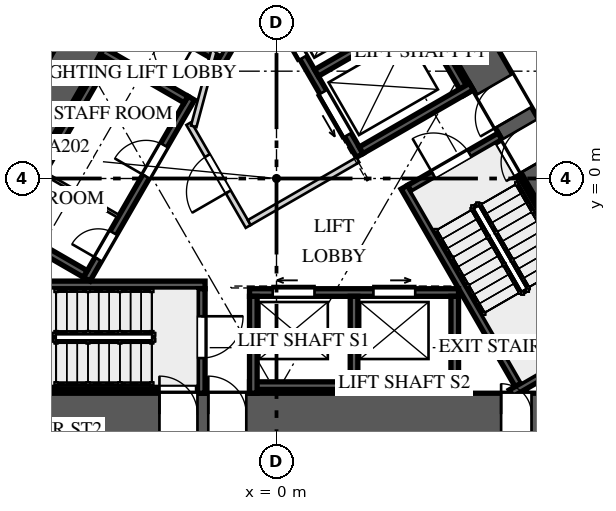
"""IFC4 building model, lengths in metres.
Left out: names, types, materials, properties, quantities, classifications, styles, units other than length and angle.
Written with IfcOpenShell. Run it as: python <this file> out.ifc"""

import sys

from ifc_helpers import new_model, si_unit, direction, frame, frame_2d, origin, place, context, subcontext, project, spatial, rectangle, extrude, element, fill, save


model = new_model("IFC4")
c1 = context("Model", 3, precision=1e-05, world=origin(), true_north=direction((0.0, 1.0)))
c2 = subcontext(c1, "Body", "Model", "MODEL_VIEW")
j1 = project(units=[si_unit("LENGTHUNIT", "METRE"), si_unit("PLANEANGLEUNIT", "RADIAN")], contexts=[c1])
p1 = place(None, origin())
s1 = spatial("IfcSite", under=j1, at=p1, CompositionType="ELEMENT")
p2 = place(p1, origin())
s2 = spatial("IfcBuilding", under=s1, at=p2, CompositionType="ELEMENT")
p3 = place(p2, origin())
s3 = spatial("IfcBuildingStorey", under=s2, at=p3, CompositionType="ELEMENT", Elevation=0.0)
p4 = place(p3, frame((-1.126, 10.45, 0.0), z_axis=(0.0, 0.0, 1.0), x_axis=(-0.500001757713, -0.866024388966, 0.0)))
e1 = element("IfcWall", 1, at=p4, inside=s3, PredefinedType="SHEAR", context=c2, shape_type="SweptSolid", body=[
    extrude(rectangle(XDim=16.974, YDim=1.1, at=frame_2d((8.487, 0.0))), origin(), (0.0, 0.0, 1.0), 10.0),
])
p5 = place(p4, frame((5.407, 0.0, 0.0)))
e2 = element("IfcOpeningElement", 2, at=p5, cuts=e1, PredefinedType="OPENING", context=c2, shape_type="SweptSolid", body=[
    extrude(rectangle(XDim=1.0, YDim=2.4, at=frame_2d((0.5, 1.2))), frame((0.0, 0.56, 0.0), z_axis=(0.0, -1.0, 0.0), x_axis=(1.0, 0.0, 0.0)), (0.0, 0.0, 1.0), 1.12),
])
p6 = place(p4, frame((6.692, 0.0, 0.0)))
e3 = element("IfcOpeningElement", 3, at=p6, cuts=e1, PredefinedType="OPENING", context=c2, shape_type="SweptSolid", body=[
    extrude(rectangle(XDim=1.0, YDim=2.4, at=frame_2d((0.5, 1.2))), frame((0.0, 0.56, 0.0), z_axis=(0.0, -1.0, 0.0), x_axis=(1.0, 0.0, 0.0)), (0.0, 0.0, 1.0), 1.12),
])
p7 = place(p3, frame((-8.487, -6.2, 0.0), z_axis=(0.0, 0.0, 1.0), x_axis=(1.0, 0.0, 0.0)))
e4 = element("IfcWall", 4, at=p7, inside=s3, PredefinedType="SHEAR", context=c2, shape_type="SweptSolid", body=[
    extrude(rectangle(XDim=16.974, YDim=1.1, at=frame_2d((8.487, 0.0))), origin(), (0.0, 0.0, 1.0), 10.0),
])
p8 = place(p7, frame((5.407, 0.0, 0.0)))
e5 = element("IfcOpeningElement", 5, at=p8, cuts=e4, PredefinedType="OPENING", context=c2, shape_type="SweptSolid", body=[
    extrude(rectangle(XDim=1.0, YDim=2.4, at=frame_2d((0.5, 1.2))), frame((0.0, 0.56, 0.0), z_axis=(0.0, -1.0, 0.0), x_axis=(1.0, 0.0, 0.0)), (0.0, 0.0, 1.0), 1.12),
])
p9 = place(p7, frame((6.692, 0.0, 0.0)))
e6 = element("IfcOpeningElement", 6, at=p9, cuts=e4, PredefinedType="OPENING", context=c2, shape_type="SweptSolid", body=[
    extrude(rectangle(XDim=1.0, YDim=2.4, at=frame_2d((0.5, 1.2))), frame((0.0, 0.56, 0.0), z_axis=(0.0, -1.0, 0.0), x_axis=(1.0, 0.0, 0.0)), (0.0, 0.0, 1.0), 1.12),
])
p10 = place(p7, frame((14.397, 0.0, 0.0)))
e7 = element("IfcOpeningElement", 7, at=p10, cuts=e4, PredefinedType="OPENING", context=c2, shape_type="SweptSolid", body=[
    extrude(rectangle(XDim=0.8, YDim=2.1, at=frame_2d((0.4, 1.05))), frame((0.0, 0.56, 0.0), z_axis=(0.0, -1.0, 0.0), x_axis=(1.0, 0.0, 0.0)), (0.0, 0.0, 1.0), 1.12),
])
p11 = place(p3, frame((9.613, -4.25, 0.0), z_axis=(0.0, 0.0, 1.0), x_axis=(-0.500001757713, 0.866024388966, 0.0)))
e8 = element("IfcWall", 8, at=p11, inside=s3, PredefinedType="SHEAR", context=c2, shape_type="SweptSolid", body=[
    extrude(rectangle(XDim=16.974, YDim=1.1, at=frame_2d((8.487, 0.0))), origin(), (0.0, 0.0, 1.0), 10.0),
])
p12 = place(p11, frame((5.407, 0.0, 0.0)))
e9 = element("IfcOpeningElement", 9, at=p12, cuts=e8, PredefinedType="OPENING", context=c2, shape_type="SweptSolid", body=[
    extrude(rectangle(XDim=1.0, YDim=2.4, at=frame_2d((0.5, 1.2))), frame((0.0, 0.56, 0.0), z_axis=(0.0, -1.0, 0.0), x_axis=(1.0, 0.0, 0.0)), (0.0, 0.0, 1.0), 1.12),
])
p13 = place(p11, frame((6.762, 0.0, 0.0)))
e10 = element("IfcOpeningElement", 10, at=p13, cuts=e8, PredefinedType="OPENING", context=c2, shape_type="SweptSolid", body=[
    extrude(rectangle(XDim=1.0, YDim=2.4, at=frame_2d((0.5, 1.2))), frame((0.0, 0.56, 0.0), z_axis=(0.0, -1.0, 0.0), x_axis=(1.0, 0.0, 0.0)), (0.0, 0.0, 1.0), 1.12),
])
p14 = place(p11, frame((13.889, 0.0, 0.0)))
e11 = element("IfcOpeningElement", 11, at=p14, cuts=e8, PredefinedType="OPENING", context=c2, shape_type="SweptSolid", body=[
    extrude(rectangle(XDim=0.8, YDim=2.1, at=frame_2d((0.4, 1.05))), frame((0.0, 0.56, 0.0), z_axis=(0.0, -1.0, 0.0), x_axis=(1.0, 0.0, 0.0)), (0.0, 0.0, 1.0), 1.12),
])
p15 = place(p3, frame((1.646, 8.45, 0.0), z_axis=(0.0, 0.0, 1.0), x_axis=(-0.500006002103, -0.866021938441, 0.0)))
e12 = element("IfcWall", 12, at=p15, inside=s3, PredefinedType="SOLIDWALL", context=c2, shape_type="SweptSolid", body=[
    extrude(rectangle(XDim=6.261, YDim=0.2, at=frame_2d((3.13, 0.0))), origin(), (0.0, 0.0, 1.0), 9.65),
])
p16 = place(p3, frame((-1.521, 3.165, 0.0), z_axis=(0.0, 0.0, 1.0), x_axis=(-0.866027397988, 0.499996545922, 0.0)))
e13 = element("IfcWall", 13, at=p16, inside=s3, PredefinedType="SOLIDWALL", context=c2, shape_type="SweptSolid", body=[
    extrude(rectangle(XDim=2.75, YDim=0.2, at=frame_2d((1.375, 0.0))), origin(), (0.0, 0.0, 1.0), 9.65),
])
p17 = place(p16, frame((0.725, 0.0, 0.0)))
e14 = element("IfcOpeningElement", 14, at=p17, cuts=e13, PredefinedType="OPENING", context=c2, shape_type="SweptSolid", body=[
    extrude(rectangle(XDim=1.1, YDim=2.4, at=frame_2d((0.55, 1.2))), frame((0.0, 0.11, 0.0), z_axis=(0.0, -1.0, 0.0), x_axis=(1.0, 0.0, 0.0)), (0.0, 0.0, 1.0), 0.22),
])
p18 = place(p3, frame((-8.08, -5.45, 0.0), z_axis=(0.0, 0.0, 1.0), x_axis=(1.0, 0.0, 0.0)))
e15 = element("IfcWall", 15, at=p18, inside=s3, PredefinedType="SOLIDWALL", context=c2, shape_type="SweptSolid", body=[
    extrude(rectangle(XDim=4.95, YDim=0.2, at=frame_2d((2.475, 0.0))), origin(), (0.0, 0.0, 1.0), 9.65),
])
p19 = place(p3, frame((-8.141, -2.8, 0.0), z_axis=(0.0, 0.0, 1.0), x_axis=(1.0, 0.0, 0.0)))
e16 = element("IfcWall", 16, at=p19, inside=s3, PredefinedType="SOLIDWALL", context=c2, shape_type="SweptSolid", body=[
    extrude(rectangle(XDim=6.261, YDim=0.2, at=frame_2d((3.13, 0.0))), origin(), (0.0, 0.0, 1.0), 9.65),
])
p20 = place(p3, frame((-1.98, -2.9, 0.0), z_axis=(0.0, 0.0, 1.0), x_axis=(0.0, -1.0, 0.0)))
e17 = element("IfcWall", 17, at=p20, inside=s3, PredefinedType="SOLIDWALL", context=c2, shape_type="SweptSolid", body=[
    extrude(rectangle(XDim=2.75, YDim=0.2, at=frame_2d((1.375, 0.0))), origin(), (0.0, 0.0, 1.0), 9.65),
])
p21 = place(p20, frame((0.725, 0.0, 0.0)))
e18 = element("IfcOpeningElement", 18, at=p21, cuts=e17, PredefinedType="OPENING", context=c2, shape_type="SweptSolid", body=[
    extrude(rectangle(XDim=1.1, YDim=2.4, at=frame_2d((0.55, 1.2))), frame((0.0, 0.11, 0.0), z_axis=(0.0, -1.0, 0.0), x_axis=(1.0, 0.0, 0.0)), (0.0, 0.0, 1.0), 0.22),
])
p22 = place(p3, frame((8.76, -4.272, 0.0), z_axis=(0.0, 0.0, 1.0), x_axis=(-0.499974350878, 0.866040211805, 0.0)))
e19 = element("IfcWall", 19, at=p22, inside=s3, PredefinedType="SOLIDWALL", context=c2, shape_type="SweptSolid", body=[
    extrude(rectangle(XDim=4.95, YDim=0.2, at=frame_2d((2.475, 0.0))), origin(), (0.0, 0.0, 1.0), 9.65),
])
p23 = place(p3, frame((6.495, -5.65, 0.0), z_axis=(0.0, 0.0, 1.0), x_axis=(-0.499976754523, 0.866038824151, 0.0)))
e20 = element("IfcWall", 20, at=p23, inside=s3, PredefinedType="SOLIDWALL", context=c2, shape_type="SweptSolid", body=[
    extrude(rectangle(XDim=6.26, YDim=0.2, at=frame_2d((3.13, 0.0))), origin(), (0.0, 0.0, 1.0), 9.65),
])
p24 = place(p3, frame((6.174, -5.65, 0.0), z_axis=(0.0, 0.0, 1.0), x_axis=(0.866054327916, 0.499949898588, 0.0)))
e21 = element("IfcWall", 21, at=p24, inside=s3, PredefinedType="SOLIDWALL", context=c2, shape_type="SweptSolid", body=[
    extrude(rectangle(XDim=3.128, YDim=0.2, at=frame_2d((1.564, 0.0))), origin(), (0.0, 0.0, 1.0), 9.65),
])
p25 = place(p3, frame((3.501, -0.265, 0.0), z_axis=(0.0, 0.0, 1.0), x_axis=(0.866027397988, 0.499996545922, 0.0)))
e22 = element("IfcWall", 22, at=p25, inside=s3, PredefinedType="SOLIDWALL", context=c2, shape_type="SweptSolid", body=[
    extrude(rectangle(XDim=2.75, YDim=0.2, at=frame_2d((1.375, 0.0))), origin(), (0.0, 0.0, 1.0), 9.65),
])
p26 = place(p25, frame((0.725, 0.0, 0.0)))
e23 = element("IfcOpeningElement", 23, at=p26, cuts=e22, PredefinedType="OPENING", context=c2, shape_type="SweptSolid", body=[
    extrude(rectangle(XDim=1.1, YDim=2.4, at=frame_2d((0.55, 1.2))), frame((0.0, 0.11, 0.0), z_axis=(0.0, -1.0, 0.0), x_axis=(1.0, 0.0, 0.0)), (0.0, 0.0, 1.0), 0.22),
])
p27 = place(p3, frame((-4.993, -2.648, 0.0), z_axis=(0.0, 0.0, 1.0), x_axis=(0.499996545922, 0.866027397988, 0.0)))
e24 = element("IfcWall", 24, at=p27, inside=s3, PredefinedType="SOLIDWALL", context=c2, shape_type="SweptSolid", body=[
    extrude(rectangle(XDim=5.5, YDim=0.2, at=frame_2d((2.75, 0.0))), origin(), (0.0, 0.0, 1.0), 9.65),
])
p28 = place(p27, frame((3.12, 0.0, 0.0)))
e25 = element("IfcOpeningElement", 25, at=p28, cuts=e24, PredefinedType="OPENING", context=c2, shape_type="SweptSolid", body=[
    extrude(rectangle(XDim=0.95, YDim=2.4, at=frame_2d((0.475, 1.2))), frame((0.0, 0.11, 0.0), z_axis=(0.0, -1.0, 0.0), x_axis=(1.0, 0.0, 0.0)), (0.0, 0.0, 1.0), 0.22),
])
p29 = place(p27, frame((0.605, 0.0, 0.0)))
e26 = element("IfcOpeningElement", 26, at=p29, cuts=e24, PredefinedType="OPENING", context=c2, shape_type="SweptSolid", body=[
    extrude(rectangle(XDim=0.8, YDim=2.1, at=frame_2d((0.4, 1.05))), frame((0.0, 0.11, 0.0), z_axis=(0.0, -1.0, 0.0), x_axis=(1.0, 0.0, 0.0)), (0.0, 0.0, 1.0), 0.22),
])
p30 = place(p3, frame((-4.365, 3.34, 0.0), z_axis=(0.0, 0.0, 1.0), x_axis=(-0.499996545922, -0.866027397988, 0.0)))
e27 = element("IfcWall", 27, at=p30, inside=s3, PredefinedType="SOLIDWALL", context=c2, shape_type="SweptSolid", body=[
    extrude(rectangle(XDim=5.5, YDim=0.2, at=frame_2d((2.75, 0.0))), origin(), (0.0, 0.0, 1.0), 9.65),
])
for number, where, z_axis, x_axis in (
    (28, (-2.38, 2.078, 0.0), (0.0, 0.0, 1.0), (-0.866, 0.5, 0.0)),
    (29, (-5.03, -2.512, 0.0), (0.0, 0.0, 1.0), (-0.866, 0.5, 0.0)),
):
    element("IfcWall", number, at=place(p3, frame(where, z_axis=z_axis, x_axis=x_axis)), inside=s3, PredefinedType="SOLIDWALL", context=c2, shape_type="SweptSolid", body=[
        extrude(rectangle(XDim=2.55, YDim=0.2, at=frame_2d((1.275, 0.0))), origin(), (0.0, 0.0, 1.0), 9.65),
    ])
p31 = place(p3, frame((-4.155, -0.996, 0.0), z_axis=(0.0, 0.0, 1.0), x_axis=(-0.866016039709, 0.500016218704, 0.0)))
e30 = element("IfcWall", 30, at=p31, inside=s3, PredefinedType="PARTITIONING", context=c2, shape_type="SweptSolid", body=[
    extrude(rectangle(XDim=2.35, YDim=0.08, at=frame_2d((1.175, 0.0))), origin(), (0.0, 0.0, 1.0), 9.65),
])
p32 = place(p3, frame((-0.71, -3.0, 0.0), z_axis=(0.0, 0.0, 1.0), x_axis=(1.0, 0.0, 0.0)))
e31 = element("IfcWall", 31, at=p32, inside=s3, PredefinedType="SOLIDWALL", context=c2, shape_type="SweptSolid", body=[
    extrude(rectangle(XDim=5.5, YDim=0.2, at=frame_2d((2.75, 0.0))), origin(), (0.0, 0.0, 1.0), 9.65),
])
p33 = place(p32, frame((0.61, 0.0, 0.0)))
e32 = element("IfcOpeningElement", 32, at=p33, cuts=e31, PredefinedType="OPENING", context=c2, shape_type="SweptSolid", body=[
    extrude(rectangle(XDim=1.1, YDim=2.1, at=frame_2d((0.55, 1.05))), frame((0.0, 0.11, 0.0), z_axis=(0.0, -1.0, 0.0), x_axis=(1.0, 0.0, 0.0)), (0.0, 0.0, 1.0), 0.22),
])
p34 = place(p32, frame((3.26, 0.0, 0.0)))
e33 = element("IfcOpeningElement", 33, at=p34, cuts=e31, PredefinedType="OPENING", context=c2, shape_type="SweptSolid", body=[
    extrude(rectangle(XDim=1.1, YDim=2.1, at=frame_2d((0.55, 1.05))), frame((0.0, 0.11, 0.0), z_axis=(0.0, -1.0, 0.0), x_axis=(1.0, 0.0, 0.0)), (0.0, 0.0, 1.0), 0.22),
])
p35 = place(p3, frame((-0.71, -5.45, 0.0), z_axis=(0.0, 0.0, 1.0), x_axis=(1.0, 0.0, 0.0)))
e34 = element("IfcWall", 34, at=p35, inside=s3, PredefinedType="SOLIDWALL", context=c2, shape_type="SweptSolid", body=[
    extrude(rectangle(XDim=5.5, YDim=0.2, at=frame_2d((2.75, 0.0))), origin(), (0.0, 0.0, 1.0), 9.65),
])
for number, where, z_axis, x_axis in (
    (35, (-0.61, -3.1, 0.0), (0.0, 0.0, 1.0), (0.0, -1.0, 0.0)),
    (36, (2.04, -3.1, 0.0), (0.0, 0.0, 1.0), (0.0, -1.0, 0.0)),
    (37, (4.69, -3.1, 0.0), (0.0, 0.0, 1.0), (0.0, -1.0, 0.0)),
):
    element("IfcWall", number, at=place(p3, frame(where, z_axis=z_axis, x_axis=x_axis)), inside=s3, PredefinedType="SOLIDWALL", context=c2, shape_type="SweptSolid", body=[
        extrude(rectangle(XDim=2.55, YDim=0.2, at=frame_2d((1.275, 0.0))), origin(), (0.0, 0.0, 1.0), 9.65),
    ])
p36 = place(p3, frame((2.19, 0.606, 0.0), z_axis=(0.0, 0.0, 1.0), x_axis=(-0.500002801628, 0.866023786258, 0.0)))
e38 = element("IfcWall", 38, at=p36, inside=s3, PredefinedType="SOLIDWALL", context=c2, shape_type="SweptSolid", body=[
    extrude(rectangle(XDim=4.9, YDim=0.2, at=frame_2d((2.45, 0.0))), origin(), (0.0, 0.0, 1.0), 9.65),
])
p37 = place(p36, frame((0.625, 0.0, 0.0)))
e39 = element("IfcOpeningElement", 39, at=p37, cuts=e38, PredefinedType="OPENING", context=c2, shape_type="SweptSolid", body=[
    extrude(rectangle(XDim=1.3, YDim=2.1, at=frame_2d((0.65, 1.05))), frame((0.0, 0.11, 0.0), z_axis=(0.0, -1.0, 0.0), x_axis=(1.0, 0.0, 0.0)), (0.0, 0.0, 1.0), 0.22),
])
p38 = place(p36, frame((2.975, 0.0, 0.0)))
e40 = element("IfcOpeningElement", 40, at=p38, cuts=e38, PredefinedType="OPENING", context=c2, shape_type="SweptSolid", body=[
    extrude(rectangle(XDim=1.3, YDim=2.1, at=frame_2d((0.65, 1.05))), frame((0.0, 0.11, 0.0), z_axis=(0.0, -1.0, 0.0), x_axis=(1.0, 0.0, 0.0)), (0.0, 0.0, 1.0), 0.22),
])
p39 = place(p3, frame((5.005, 2.231, 0.0), z_axis=(0.0, 0.0, 1.0), x_axis=(-0.500002801628, 0.866023786258, 0.0)))
e41 = element("IfcWall", 41, at=p39, inside=s3, PredefinedType="SOLIDWALL", context=c2, shape_type="SweptSolid", body=[
    extrude(rectangle(XDim=4.9, YDim=0.2, at=frame_2d((2.45, 0.0))), origin(), (0.0, 0.0, 1.0), 9.65),
])
p40 = place(p3, frame((2.227, 0.743, 0.0), z_axis=(0.0, 0.0, 1.0), x_axis=(0.866014461049, 0.500018952895, 0.0)))
e42 = element("IfcWall", 42, at=p40, inside=s3, PredefinedType="SOLIDWALL", context=c2, shape_type="SweptSolid", body=[
    extrude(rectangle(XDim=3.35, YDim=0.2, at=frame_2d((1.675, 0.0))), origin(), (0.0, 0.0, 1.0), 9.65),
])
p41 = place(p3, frame((1.052, 2.778, 0.0), z_axis=(0.0, 0.0, 1.0), x_axis=(0.866032680314, 0.499987396469, 0.0)))
e43 = element("IfcWall", 43, at=p41, inside=s3, PredefinedType="SOLIDWALL", context=c2, shape_type="SweptSolid", body=[
    extrude(rectangle(XDim=3.35, YDim=0.2, at=frame_2d((1.675, 0.0))), origin(), (0.0, 0.0, 1.0), 9.65),
])
p42 = place(p3, frame((-0.744, -1.261, 0.0), z_axis=(0.0, 0.0, 1.0), x_axis=(-0.500004234368, 0.866022959057, 0.0)))
e44 = element("IfcWall", 44, at=p42, inside=s3, PredefinedType="PARTITIONING", context=c2, shape_type="SweptSolid", body=[
    extrude(rectangle(XDim=3.125, YDim=0.15, at=frame_2d((1.562, 0.0))), origin(), (0.0, 0.0, 1.0), 9.65),
])
p43 = place(p42, frame((1.05, 0.0, 0.0)))
e45 = element("IfcOpeningElement", 45, at=p43, cuts=e44, PredefinedType="OPENING", context=c2, shape_type="SweptSolid", body=[
    extrude(rectangle(XDim=1.1, YDim=2.4, at=frame_2d((0.55, 1.2))), frame((0.0, 0.085, 0.0), z_axis=(0.0, -1.0, 0.0), x_axis=(1.0, 0.0, 0.0)), (0.0, 0.0, 1.0), 0.17),
])
p44 = place(p3, frame((-0.717, -1.159, 0.0), z_axis=(0.0, 0.0, 1.0), x_axis=(0.866008176907, 0.50002983664, 0.0)))
e46 = element("IfcWall", 46, at=p44, inside=s3, PredefinedType="PARTITIONING", context=c2, shape_type="SweptSolid", body=[
    extrude(rectangle(XDim=3.3, YDim=0.15, at=frame_2d((1.65, 0.0))), origin(), (0.0, 0.0, 1.0), 9.65),
])
p45 = place(p3, frame((-2.178, 1.372, 0.0), z_axis=(0.0, 0.0, 1.0), x_axis=(0.258808958833, 0.96592852884, 0.0)))
e47 = element("IfcWall", 47, at=p45, inside=s3, PredefinedType="PARTITIONING", context=c2, shape_type="SweptSolid", body=[
    extrude(rectangle(XDim=2.903, YDim=0.15, at=frame_2d((1.451, 0.0))), origin(), (0.0, 0.0, 1.0), 9.65),
])
p46 = place(p21, origin())
e48 = element("IfcDoor", 48, at=p46, inside=s3, OperationType="SINGLE_SWING_LEFT", PredefinedType="DOOR", context=c2, shape_type="SweptSolid", body=[
    extrude(rectangle(XDim=1.1, YDim=2.4, at=frame_2d((0.55, 1.2))), frame((0.0, 0.025, 0.0), z_axis=(0.0, -1.0, 0.0), x_axis=(1.0, 0.0, 0.0)), (0.0, 0.0, 1.0), 0.05),
])
fill(e18, e48)
p47 = place(p26, origin())
e49 = element("IfcDoor", 49, at=p47, inside=s3, OperationType="SINGLE_SWING_RIGHT", PredefinedType="DOOR", context=c2, shape_type="SweptSolid", body=[
    extrude(rectangle(XDim=1.1, YDim=2.4, at=frame_2d((0.55, 1.2))), frame((0.0, 0.025, 0.0), z_axis=(0.0, -1.0, 0.0), x_axis=(1.0, 0.0, 0.0)), (0.0, 0.0, 1.0), 0.05),
])
fill(e23, e49)
p48 = place(p28, origin())
e50 = element("IfcDoor", 50, at=p48, inside=s3, OperationType="SINGLE_SWING_LEFT", PredefinedType="DOOR", context=c2, shape_type="SweptSolid", body=[
    extrude(rectangle(XDim=0.95, YDim=2.4, at=frame_2d((0.475, 1.2))), frame((0.0, 0.025, 0.0), z_axis=(0.0, -1.0, 0.0), x_axis=(1.0, 0.0, 0.0)), (0.0, 0.0, 1.0), 0.05),
])
fill(e25, e50)
p49 = place(p29, origin())
e51 = element("IfcDoor", 51, at=p49, inside=s3, OperationType="SINGLE_SWING_RIGHT", PredefinedType="DOOR", context=c2, shape_type="SweptSolid", body=[
    extrude(rectangle(XDim=0.8, YDim=2.1, at=frame_2d((0.4, 1.05))), frame((0.0, 0.025, 0.0), z_axis=(0.0, -1.0, 0.0), x_axis=(1.0, 0.0, 0.0)), (0.0, 0.0, 1.0), 0.05),
])
fill(e26, e51)
p50 = place(p33, origin())
e52 = element("IfcDoor", 52, at=p50, inside=s3, OperationType="SLIDING_TO_LEFT", PredefinedType="DOOR", context=c2, shape_type="SweptSolid", body=[
    extrude(rectangle(XDim=1.1, YDim=2.1, at=frame_2d((0.55, 1.05))), frame((0.0, 0.025, 0.0), z_axis=(0.0, -1.0, 0.0), x_axis=(1.0, 0.0, 0.0)), (0.0, 0.0, 1.0), 0.05),
])
fill(e32, e52)
p51 = place(p34, origin())
e53 = element("IfcDoor", 53, at=p51, inside=s3, OperationType="SLIDING_TO_RIGHT", PredefinedType="DOOR", context=c2, shape_type="SweptSolid", body=[
    extrude(rectangle(XDim=1.1, YDim=2.1, at=frame_2d((0.55, 1.05))), frame((0.0, 0.025, 0.0), z_axis=(0.0, -1.0, 0.0), x_axis=(1.0, 0.0, 0.0)), (0.0, 0.0, 1.0), 0.05),
])
fill(e33, e53)
p52 = place(p37, origin())
e54 = element("IfcDoor", 54, at=p52, inside=s3, OperationType="SLIDING_TO_LEFT", PredefinedType="DOOR", context=c2, shape_type="SweptSolid", body=[
    extrude(rectangle(XDim=1.3, YDim=2.1, at=frame_2d((0.65, 1.05))), frame((0.0, 0.025, 0.0), z_axis=(0.0, -1.0, 0.0), x_axis=(1.0, 0.0, 0.0)), (0.0, 0.0, 1.0), 0.05),
])
fill(e39, e54)
p53 = place(p38, origin())
e55 = element("IfcDoor", 55, at=p53, inside=s3, OperationType="SLIDING_TO_RIGHT", PredefinedType="DOOR", context=c2, shape_type="SweptSolid", body=[
    extrude(rectangle(XDim=1.3, YDim=2.1, at=frame_2d((0.65, 1.05))), frame((0.0, 0.025, 0.0), z_axis=(0.0, -1.0, 0.0), x_axis=(1.0, 0.0, 0.0)), (0.0, 0.0, 1.0), 0.05),
])
fill(e40, e55)
p54 = place(p8, origin())
e56 = element("IfcDoor", 56, at=p54, inside=s3, OperationType="SINGLE_SWING_RIGHT", PredefinedType="DOOR", context=c2, shape_type="SweptSolid", body=[
    extrude(rectangle(XDim=1.0, YDim=2.4, at=frame_2d((0.5, 1.2))), frame((0.0, 0.025, 0.0), z_axis=(0.0, -1.0, 0.0), x_axis=(1.0, 0.0, 0.0)), (0.0, 0.0, 1.0), 0.05),
])
fill(e5, e56)
p55 = place(p12, origin())
e57 = element("IfcDoor", 57, at=p55, inside=s3, OperationType="SINGLE_SWING_LEFT", PredefinedType="DOOR", context=c2, shape_type="SweptSolid", body=[
    extrude(rectangle(XDim=1.0, YDim=2.4, at=frame_2d((0.5, 1.2))), frame((0.0, 0.025, 0.0), z_axis=(0.0, -1.0, 0.0), x_axis=(1.0, 0.0, 0.0)), (0.0, 0.0, 1.0), 0.05),
])
fill(e9, e57)
p56 = place(p43, origin())
e58 = element("IfcDoor", 58, at=p56, inside=s3, OperationType="SINGLE_SWING_RIGHT", PredefinedType="DOOR", context=c2, shape_type="SweptSolid", body=[
    extrude(rectangle(XDim=1.1, YDim=2.4, at=frame_2d((0.55, 1.2))), frame((0.0, 0.025, 0.0), z_axis=(0.0, -1.0, 0.0), x_axis=(1.0, 0.0, 0.0)), (0.0, 0.0, 1.0), 0.05),
])
fill(e45, e58)
p57 = place(p9, origin())
e59 = element("IfcDoor", 59, at=p57, inside=s3, OperationType="SINGLE_SWING_RIGHT", PredefinedType="DOOR", context=c2, shape_type="SweptSolid", body=[
    extrude(rectangle(XDim=1.0, YDim=2.4, at=frame_2d((0.5, 1.2))), frame((0.0, 0.025, 0.0), z_axis=(0.0, -1.0, 0.0), x_axis=(1.0, 0.0, 0.0)), (0.0, 0.0, 1.0), 0.05),
])
fill(e6, e59)
p58 = place(p13, origin())
e60 = element("IfcDoor", 60, at=p58, inside=s3, OperationType="SINGLE_SWING_LEFT", PredefinedType="DOOR", context=c2, shape_type="SweptSolid", body=[
    extrude(rectangle(XDim=1.0, YDim=2.4, at=frame_2d((0.5, 1.2))), frame((0.0, 0.025, 0.0), z_axis=(0.0, -1.0, 0.0), x_axis=(1.0, 0.0, 0.0)), (0.0, 0.0, 1.0), 0.05),
])
fill(e10, e60)
p59 = place(p10, origin())
e61 = element("IfcDoor", 61, at=p59, inside=s3, OperationType="SINGLE_SWING_RIGHT", PredefinedType="DOOR", context=c2, shape_type="SweptSolid", body=[
    extrude(rectangle(XDim=0.8, YDim=2.1, at=frame_2d((0.4, 1.05))), frame((0.0, 0.025, 0.0), z_axis=(0.0, -1.0, 0.0), x_axis=(1.0, 0.0, 0.0)), (0.0, 0.0, 1.0), 0.05),
])
fill(e7, e61)
save(model, sys.argv[1])
